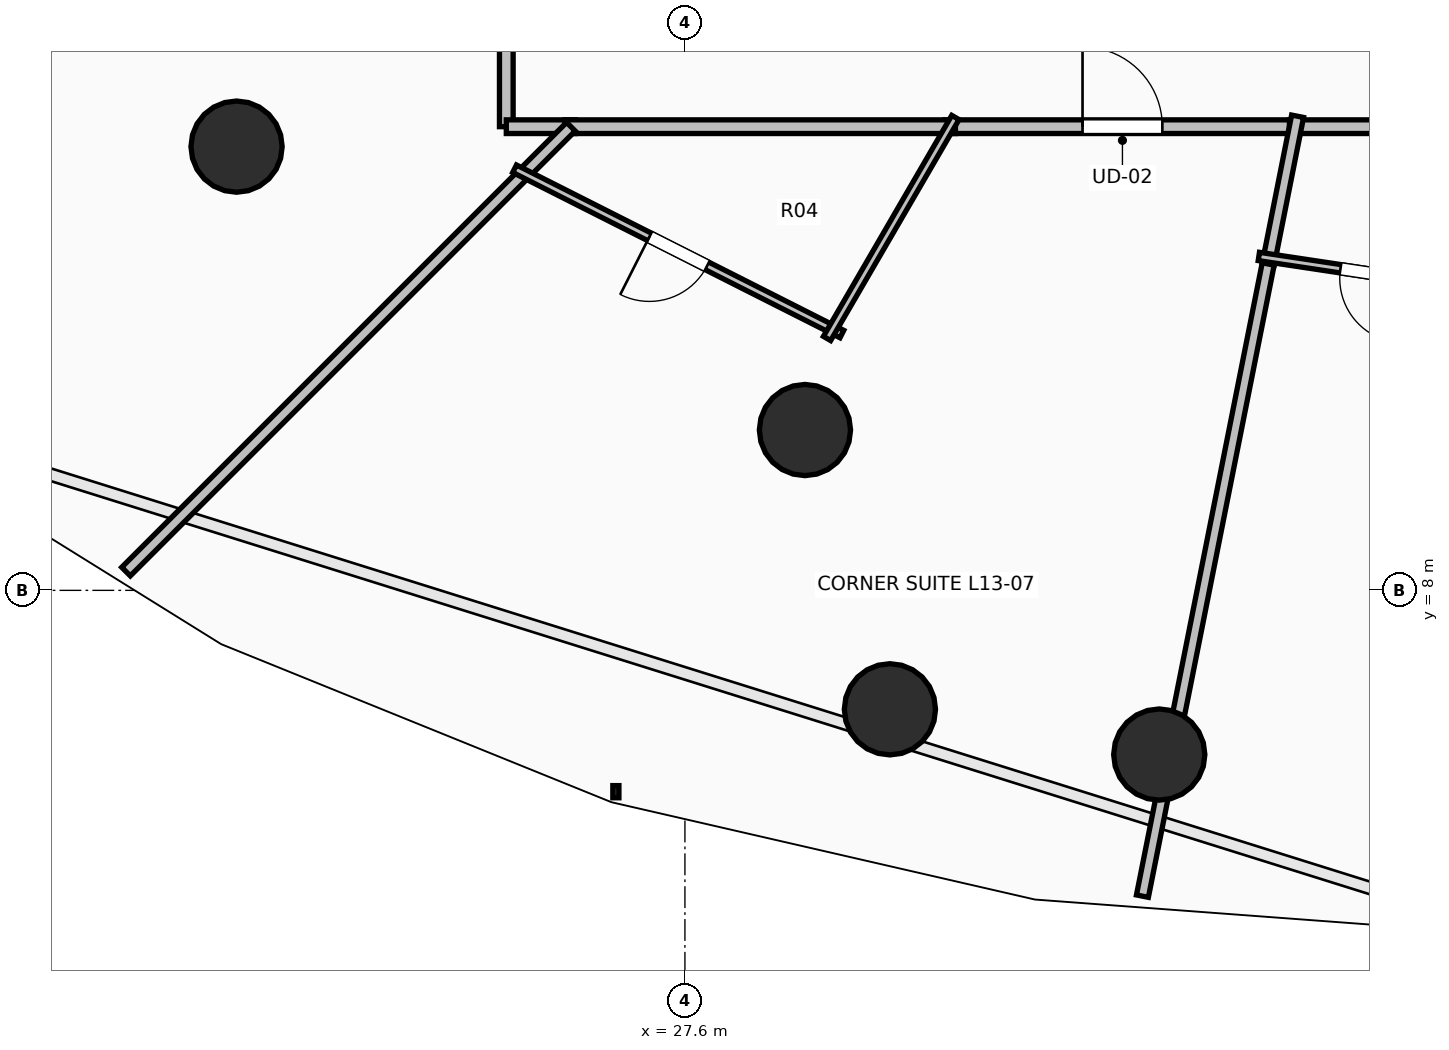
"""IFC4 building model, lengths in metres.
Left out: names, types, materials, properties, quantities, classifications, styles, units other than length and angle.
Written with IfcOpenShell. Run it as: python <this file> out.ifc"""

import sys

from ifc_helpers import new_model, si_unit, direction, frame, frame_2d, origin, origin_2d, place, context, subcontext, project, spatial, rectangle, circle, extrude, element, fill, save


model = new_model("IFC4")
c1 = context("Model", 3, precision=1e-05, world=origin(), true_north=direction((0.0, 1.0)))
c2 = subcontext(c1, "Body", "Model", "MODEL_VIEW")
j1 = project(units=[si_unit("LENGTHUNIT", "METRE"), si_unit("PLANEANGLEUNIT", "RADIAN")], contexts=[c1])
p1 = place(None, origin())
s1 = spatial("IfcSite", under=j1, at=p1, CompositionType="ELEMENT")
p2 = place(p1, origin())
s2 = spatial("IfcBuilding", under=s1, at=p2, CompositionType="ELEMENT")
p3 = place(p2, frame((0.0, 0.0, 52.0)))
s3 = spatial("IfcBuildingStorey", under=s2, at=p3, CompositionType="ELEMENT", Elevation=52.0)
for number, where, z_axis, x_axis in (
    (1, (21.701, 13.838, 0.0), (0.0, 0.0, 1.0), (-0.707, -0.707, 0.0)),
    (2, (29.179, 10.109, 0.0), (0.0, 0.0, 1.0), (-0.383, -0.924, 0.0)),
    (3, (30.297, 6.435, 0.0), (0.0, 0.0, 1.0), (-0.383, -0.924, 0.0)),
    (4, (33.84, 5.84, 0.0), (0.0, 0.0, 1.0), (0.0, -1.0, 0.0)),
):
    element("IfcColumn", number, at=place(p3, frame(where, z_axis=z_axis, x_axis=x_axis)), inside=s3, PredefinedType="COLUMN", context=c2, shape_type="SweptSolid", body=[
        extrude(circle(Radius=0.6, at=origin_2d()), origin(), (0.0, 0.0, 1.0), 3.5),
    ])
p4 = place(p3, frame((25.25, 19.814, 0.0), z_axis=(0.0, 0.0, 1.0), x_axis=(0.0, -1.0, 0.0)))
e5 = element("IfcWall", 5, at=p4, inside=s3, PredefinedType="PARTITIONING", context=c2, shape_type="SweptSolid", body=[
    extrude(rectangle(XDim=5.714, YDim=0.18, at=frame_2d((2.857, 0.0))), origin(), (0.0, 0.0, 1.0), 2.432),
])
p5 = place(p4, frame((2.332, 0.0, 0.0)))
e6 = element("IfcOpeningElement", 6, at=p5, cuts=e5, PredefinedType="OPENING", context=c2, shape_type="SweptSolid", body=[
    extrude(rectangle(XDim=1.05, YDim=2.2, at=frame_2d((0.525, 1.1))), frame((0.0, 0.105, 0.0), z_axis=(0.0, -1.0, 0.0), x_axis=(1.0, 0.0, 0.0)), (0.0, 0.0, 1.0), 0.21),
])
p6 = place(p3, frame((25.25, 14.1, 0.0), z_axis=(0.0, 0.0, 1.0), x_axis=(1.0, 0.0, 0.0)))
e7 = element("IfcWall", 7, at=p6, inside=s3, PredefinedType="PARTITIONING", context=c2, shape_type="SweptSolid", body=[
    extrude(rectangle(XDim=0.91, YDim=0.18, at=frame_2d((0.455, 0.0))), origin(), (0.0, 0.0, 1.0), 2.886),
])
p7 = place(p3, frame((31.019, 14.1, 0.0), z_axis=(0.0, 0.0, 1.0), x_axis=(1.0, 0.0, 0.0)))
e8 = element("IfcWall", 8, at=p7, inside=s3, PredefinedType="PARTITIONING", context=c2, shape_type="SweptSolid", body=[
    extrude(rectangle(XDim=4.674, YDim=0.18, at=frame_2d((2.337, 0.0))), origin(), (0.0, 0.0, 1.0), 3.24),
])
p8 = place(p7, frame((1.812, 0.0, 0.0)))
e9 = element("IfcOpeningElement", 9, at=p8, cuts=e8, PredefinedType="OPENING", context=c2, shape_type="SweptSolid", body=[
    extrude(rectangle(XDim=1.05, YDim=2.2, at=frame_2d((0.525, 1.1))), frame((0.0, 0.105, 0.0), z_axis=(0.0, -1.0, 0.0), x_axis=(1.0, 0.0, 0.0)), (0.0, 0.0, 1.0), 0.21),
])
p9 = place(p3, frame((26.02, 14.1, 0.0), z_axis=(0.0, 0.0, 1.0), x_axis=(1.0, 0.0, 0.0)))
e10 = element("IfcWall", 10, at=p9, inside=s3, PredefinedType="PARTITIONING", context=c2, shape_type="SweptSolid", body=[
    extrude(rectangle(XDim=5.139, YDim=0.18, at=frame_2d((2.569, 0.0))), origin(), (0.0, 0.0, 1.0), 2.432),
])
p10 = place(p3, frame((35.553, 14.1, 0.0), z_axis=(0.0, 0.0, 1.0), x_axis=(1.0, 0.0, 0.0)))
e11 = element("IfcWall", 11, at=p10, inside=s3, PredefinedType="PARTITIONING", context=c2, shape_type="SweptSolid", body=[
    extrude(rectangle(XDim=3.276, YDim=0.18, at=frame_2d((1.638, 0.0))), origin(), (0.0, 0.0, 1.0), 3.24),
])
p11 = place(p3, frame((20.247, 8.247, 0.0), z_axis=(0.0, 0.0, 1.0), x_axis=(0.707106781187, 0.707106781187, 0.0)))
e12 = element("IfcWall", 12, at=p11, inside=s3, PredefinedType="PARTITIONING", context=c2, shape_type="SweptSolid", body=[
    extrude(rectangle(XDim=8.277, YDim=0.16, at=frame_2d((4.139, 0.0))), origin(), (0.0, 0.0, 1.0), 2.624),
])
p12 = place(p3, frame((29.665, 11.372, 0.0), z_axis=(0.0, 0.0, 1.0), x_axis=(-0.892577568201, 0.450893873039, 0.0)))
e13 = element("IfcWall", 13, at=p12, inside=s3, PredefinedType="PARTITIONING", context=c2, shape_type="SweptSolid", body=[
    extrude(rectangle(XDim=4.824, YDim=0.11, at=frame_2d((2.412, 0.0))), origin(), (0.0, 0.0, 1.0), 2.432),
])
p13 = place(p12, frame((1.987, 0.0, 0.0)))
e14 = element("IfcOpeningElement", 14, at=p13, cuts=e13, PredefinedType="OPENING", context=c2, shape_type="SweptSolid", body=[
    extrude(rectangle(XDim=0.85, YDim=2.1, at=frame_2d((0.425, 1.05))), frame((0.0, 0.07, 0.0), z_axis=(0.0, -1.0, 0.0), x_axis=(1.0, 0.0, 0.0)), (0.0, 0.0, 1.0), 0.14),
])
p14 = place(p3, frame((31.158, 14.221, 0.0), z_axis=(0.0, 0.0, 1.0), x_axis=(-0.50222661214, -0.864736046466, 0.0)))
e15 = element("IfcWall", 15, at=p14, inside=s3, PredefinedType="PARTITIONING", context=c2, shape_type="SweptSolid", body=[
    extrude(rectangle(XDim=3.362, YDim=0.11, at=frame_2d((1.681, 0.0))), origin(), (0.0, 0.0, 1.0), 2.886),
])
p15 = place(p3, frame((33.619, 3.977, 0.0), z_axis=(0.0, 0.0, 1.0), x_axis=(0.195151937053, 0.980773022398, 0.0)))
e16 = element("IfcWall", 16, at=p15, inside=s3, PredefinedType="PARTITIONING", context=c2, shape_type="SweptSolid", body=[
    extrude(rectangle(XDim=8.62, YDim=0.16, at=frame_2d((4.31, 0.0))), origin(), (0.0, 0.0, 1.0), 2.432),
])
p16 = place(p3, frame((35.274, 12.294, 0.0), z_axis=(0.0, 0.0, 1.0), x_axis=(0.194907646023, 0.980821599233, 0.0)))
e17 = element("IfcWall", 17, at=p16, inside=s3, PredefinedType="PARTITIONING", context=c2, shape_type="SweptSolid", body=[
    extrude(rectangle(XDim=1.982, YDim=0.16, at=frame_2d((0.991, 0.0))), origin(), (0.0, 0.0, 1.0), 2.886),
])
p17 = place(p3, frame((38.138, 11.943, 0.0), z_axis=(0.0, 0.0, 1.0), x_axis=(-0.988861549405, 0.148838288446, 0.0)))
e18 = element("IfcWall", 18, at=p17, inside=s3, PredefinedType="PARTITIONING", context=c2, shape_type="SweptSolid", body=[
    extrude(rectangle(XDim=3.021, YDim=0.11, at=frame_2d((1.511, 0.0))), origin(), (0.0, 0.0, 1.0), 3.24),
])
p18 = place(p17, frame((1.086, 0.0, 0.0)))
e19 = element("IfcOpeningElement", 19, at=p18, cuts=e18, PredefinedType="OPENING", context=c2, shape_type="SweptSolid", body=[
    extrude(rectangle(XDim=0.85, YDim=2.1, at=frame_2d((0.425, 1.05))), frame((0.0, 0.07, 0.0), z_axis=(0.0, -1.0, 0.0), x_axis=(1.0, 0.0, 0.0)), (0.0, 0.0, 1.0), 0.14),
])
p19 = place(p8, origin())
e20 = element("IfcDoor", 20, at=p19, inside=s3, OperationType="SINGLE_SWING_LEFT", PredefinedType="DOOR", context=c2, shape_type="SweptSolid", body=[
    extrude(rectangle(XDim=1.05, YDim=2.2, at=frame_2d((0.525, 1.1))), frame((0.0, 0.025, 0.0), z_axis=(0.0, -1.0, 0.0), x_axis=(1.0, 0.0, 0.0)), (0.0, 0.0, 1.0), 0.05),
])
fill(e9, e20)
p20 = place(p13, origin())
e21 = element("IfcDoor", 21, at=p20, inside=s3, OperationType="SINGLE_SWING_RIGHT", PredefinedType="DOOR", context=c2, shape_type="SweptSolid", body=[
    extrude(rectangle(XDim=0.85, YDim=2.1, at=frame_2d((0.425, 1.05))), frame((0.0, 0.025, 0.0), z_axis=(0.0, -1.0, 0.0), x_axis=(1.0, 0.0, 0.0)), (0.0, 0.0, 1.0), 0.05),
])
fill(e14, e21)
p21 = place(p18, origin())
e22 = element("IfcDoor", 22, at=p21, inside=s3, OperationType="SINGLE_SWING_LEFT", PredefinedType="DOOR", context=c2, shape_type="SweptSolid", body=[
    extrude(rectangle(XDim=0.85, YDim=2.1, at=frame_2d((0.425, 1.05))), frame((0.0, 0.025, 0.0), z_axis=(0.0, -1.0, 0.0), x_axis=(1.0, 0.0, 0.0)), (0.0, 0.0, 1.0), 0.05),
])
fill(e19, e22)
save(model, sys.argv[1])
